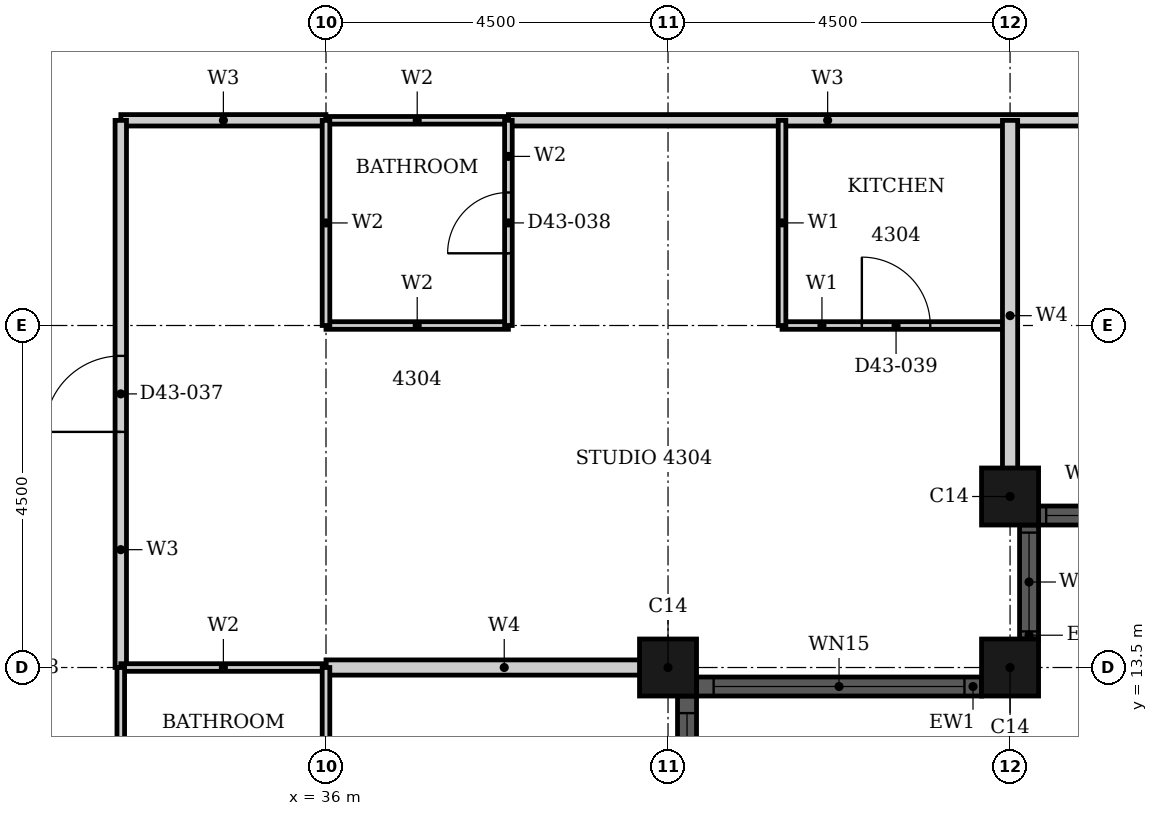
"""IFC4 building model, lengths in metres.
Left out: names, types, materials, properties, quantities, classifications, styles, units other than length and angle.
Written with IfcOpenShell. Run it as: python <this file> out.ifc"""

import sys

from ifc_helpers import new_model, si_unit, direction, frame, frame_2d, origin, origin_2d, place, context, subcontext, project, spatial, rectangle, hollow_rectangle, extrude, element, fill, save


model = new_model("IFC4")
c1 = context("Model", 3, precision=1e-05, world=origin(), true_north=direction((0.0, 1.0)))
c2 = subcontext(c1, "Body", "Model", "MODEL_VIEW")
j1 = project(units=[si_unit("LENGTHUNIT", "METRE"), si_unit("PLANEANGLEUNIT", "RADIAN")], contexts=[c1])
p1 = place(None, origin())
s1 = spatial("IfcSite", under=j1, at=p1, CompositionType="ELEMENT")
p2 = place(p1, origin())
s2 = spatial("IfcBuilding", under=s1, at=p2, CompositionType="ELEMENT")
p3 = place(p2, frame((0.0, 0.0, 172.8)))
s3 = spatial("IfcBuildingStorey", under=s2, at=p3, CompositionType="ELEMENT", Elevation=172.8)
for number, where, z_axis, x_axis in (
    (1, (40.5, 13.5, 0.0), (0.0, 0.0, 1.0), (1.0, 0.0, 0.0)),
    (2, (45.0, 13.5, 0.0), (0.0, 0.0, 1.0), (1.0, 0.0, 0.0)),
    (3, (45.0, 15.75, 0.0), (0.0, 0.0, 1.0), (1.0, 0.0, 0.0)),
):
    element("IfcColumn", number, at=place(p3, frame(where, z_axis=z_axis, x_axis=x_axis)), inside=s3, PredefinedType="COLUMN", context=c2, shape_type="SweptSolid", body=[
        extrude(hollow_rectangle(XDim=0.75, YDim=0.75, WallThickness=0.024, at=origin_2d()), origin(), (0.0, 0.0, 1.0), 3.7),
    ])
p4 = place(p3, frame((40.75, 4.875, 0.0), z_axis=(0.0, 0.0, 1.0), x_axis=(0.0, 1.0, 0.0)))
e4 = element("IfcWall", 4, at=p4, inside=s3, PredefinedType="SOLIDWALL", context=c2, shape_type="SweptSolid", body=[
    extrude(rectangle(XDim=8.25, YDim=0.25, at=frame_2d((4.125, 0.0))), origin(), (0.0, 0.0, 1.0), 3.7),
])
p5 = place(p4, frame((0.225, 0.0, 0.45)))
e5 = element("IfcOpeningElement", 5, at=p5, cuts=e4, PredefinedType="OPENING", context=c2, shape_type="SweptSolid", body=[
    extrude(rectangle(XDim=3.3, YDim=2.3, at=frame_2d((1.65, 1.15))), frame((0.0, 0.135, 0.0), z_axis=(0.0, -1.0, 0.0), x_axis=(1.0, 0.0, 0.0)), (0.0, 0.0, 1.0), 0.27),
])
p6 = place(p4, frame((4.725, 0.0, 0.45)))
e6 = element("IfcOpeningElement", 6, at=p6, cuts=e4, PredefinedType="OPENING", context=c2, shape_type="SweptSolid", body=[
    extrude(rectangle(XDim=3.3, YDim=2.3, at=frame_2d((1.65, 1.15))), frame((0.0, 0.135, 0.0), z_axis=(0.0, -1.0, 0.0), x_axis=(1.0, 0.0, 0.0)), (0.0, 0.0, 1.0), 0.27),
])
p7 = place(p3, frame((40.875, 13.25, 0.0), z_axis=(0.0, 0.0, 1.0), x_axis=(1.0, 0.0, 0.0)))
e7 = element("IfcWall", 7, at=p7, inside=s3, PredefinedType="SOLIDWALL", context=c2, shape_type="SweptSolid", body=[
    extrude(rectangle(XDim=3.75, YDim=0.25, at=frame_2d((1.875, 0.0))), origin(), (0.0, 0.0, 1.0), 3.7),
])
p8 = place(p7, frame((0.225, 0.0, 0.45)))
e8 = element("IfcOpeningElement", 8, at=p8, cuts=e7, PredefinedType="OPENING", context=c2, shape_type="SweptSolid", body=[
    extrude(rectangle(XDim=3.3, YDim=2.3, at=frame_2d((1.65, 1.15))), frame((0.0, 0.135, 0.0), z_axis=(0.0, -1.0, 0.0), x_axis=(1.0, 0.0, 0.0)), (0.0, 0.0, 1.0), 0.27),
])
p9 = place(p3, frame((45.25, 13.875, 0.0), z_axis=(0.0, 0.0, 1.0), x_axis=(0.0, 1.0, 0.0)))
e9 = element("IfcWall", 9, at=p9, inside=s3, PredefinedType="SOLIDWALL", context=c2, shape_type="SweptSolid", body=[
    extrude(rectangle(XDim=1.5, YDim=0.25, at=frame_2d((0.75, 0.0))), origin(), (0.0, 0.0, 1.0), 3.7),
])
p10 = place(p9, frame((0.1, 0.0, 0.9)))
e10 = element("IfcOpeningElement", 10, at=p10, cuts=e9, PredefinedType="OPENING", context=c2, shape_type="SweptSolid", body=[
    extrude(rectangle(XDim=1.3, YDim=1.85, at=frame_2d((0.65, 0.925))), frame((0.0, 0.135, 0.0), z_axis=(0.0, -1.0, 0.0), x_axis=(1.0, 0.0, 0.0)), (0.0, 0.0, 1.0), 0.27),
])
p11 = place(p3, frame((45.375, 15.5, 0.0), z_axis=(0.0, 0.0, 1.0), x_axis=(1.0, 0.0, 0.0)))
e11 = element("IfcWall", 11, at=p11, inside=s3, PredefinedType="SOLIDWALL", context=c2, shape_type="SweptSolid", body=[
    extrude(rectangle(XDim=1.5, YDim=0.25, at=frame_2d((0.75, 0.0))), origin(), (0.0, 0.0, 1.0), 3.7),
])
p12 = place(p11, frame((0.1, 0.0, 0.9)))
e12 = element("IfcOpeningElement", 12, at=p12, cuts=e11, PredefinedType="OPENING", context=c2, shape_type="SweptSolid", body=[
    extrude(rectangle(XDim=1.3, YDim=1.85, at=frame_2d((0.65, 0.925))), frame((0.0, 0.135, 0.0), z_axis=(0.0, -1.0, 0.0), x_axis=(1.0, 0.0, 0.0)), (0.0, 0.0, 1.0), 0.27),
])
p13 = place(p3, frame((33.301, 20.7, 0.0), z_axis=(0.0, 0.0, 1.0), x_axis=(1.0, 0.0, 0.0)))
e13 = element("IfcWall", 13, at=p13, inside=s3, PredefinedType="PARTITIONING", context=c2, shape_type="SweptSolid", body=[
    extrude(rectangle(XDim=2.698, YDim=0.15, at=frame_2d((1.349, 0.0))), origin(), (0.0, 0.0, 1.0), 3.4),
])
p14 = place(p3, frame((38.4, 20.7, 0.0), z_axis=(0.0, 0.0, 1.0), x_axis=(1.0, 0.0, 0.0)))
e14 = element("IfcWall", 14, at=p14, inside=s3, PredefinedType="PARTITIONING", context=c2, shape_type="SweptSolid", body=[
    extrude(rectangle(XDim=8.4, YDim=0.15, at=frame_2d((4.2, 0.0))), origin(), (0.0, 0.0, 1.0), 3.4),
])
p15 = place(p3, frame((33.3, 13.501, 0.0), z_axis=(0.0, 0.0, 1.0), x_axis=(0.0, 1.0, 0.0)))
e15 = element("IfcWall", 15, at=p15, inside=s3, PredefinedType="PARTITIONING", context=c2, shape_type="SweptSolid", body=[
    extrude(rectangle(XDim=7.198, YDim=0.15, at=frame_2d((3.599, 0.0))), origin(), (0.0, 0.0, 1.0), 3.4),
])
p16 = place(p15, frame((3.099, 0.0, 0.0)))
e16 = element("IfcOpeningElement", 16, at=p16, cuts=e15, PredefinedType="OPENING", context=c2, shape_type="SweptSolid", body=[
    extrude(rectangle(XDim=1.0, YDim=2.2, at=frame_2d((0.5, 1.1))), frame((0.0, 0.085, 0.0), z_axis=(0.0, -1.0, 0.0), x_axis=(1.0, 0.0, 0.0)), (0.0, 0.0, 1.0), 0.17),
])
p17 = place(p3, frame((42.0, 18.0, 0.0), z_axis=(0.0, 0.0, 1.0), x_axis=(1.0, 0.0, 0.0)))
e17 = element("IfcWall", 17, at=p17, inside=s3, PredefinedType="PARTITIONING", context=c2, shape_type="SweptSolid", body=[
    extrude(rectangle(XDim=3.0, YDim=0.1, at=frame_2d((1.5, 0.0))), origin(), (0.0, 0.0, 1.0), 3.4),
])
p18 = place(p17, frame((1.05, 0.0, 0.0)))
e18 = element("IfcOpeningElement", 18, at=p18, cuts=e17, PredefinedType="OPENING", context=c2, shape_type="SweptSolid", body=[
    extrude(rectangle(XDim=0.9, YDim=2.1, at=frame_2d((0.45, 1.05))), frame((0.0, 0.06, 0.0), z_axis=(0.0, -1.0, 0.0), x_axis=(1.0, 0.0, 0.0)), (0.0, 0.0, 1.0), 0.12),
])
p19 = place(p3, frame((42.0, 18.0, 0.0), z_axis=(0.0, 0.0, 1.0), x_axis=(0.0, 1.0, 0.0)))
e19 = element("IfcWall", 19, at=p19, inside=s3, PredefinedType="PARTITIONING", context=c2, shape_type="SweptSolid", body=[
    extrude(rectangle(XDim=2.7, YDim=0.1, at=frame_2d((1.35, 0.0))), origin(), (0.0, 0.0, 1.0), 3.4),
])
p20 = place(p3, frame((36.0, 13.5, 0.0), z_axis=(0.0, 0.0, 1.0), x_axis=(1.0, 0.0, 0.0)))
e20 = element("IfcWall", 20, at=p20, inside=s3, PredefinedType="PARTITIONING", context=c2, shape_type="SweptSolid", body=[
    extrude(rectangle(XDim=4.69, YDim=0.2, at=frame_2d((2.345, 0.0))), origin(), (0.0, 0.0, 1.0), 2.48),
])
p21 = place(p3, frame((45.0, 15.56, 0.0), z_axis=(0.0, 0.0, 1.0), x_axis=(0.0, 1.0, 0.0)))
e21 = element("IfcWall", 21, at=p21, inside=s3, PredefinedType="PARTITIONING", context=c2, shape_type="SweptSolid", body=[
    extrude(rectangle(XDim=5.139, YDim=0.2, at=frame_2d((2.569, 0.0))), origin(), (0.0, 0.0, 1.0), 3.4),
])
p22 = place(p3, frame((33.301, 13.5, 0.0), z_axis=(0.0, 0.0, 1.0), x_axis=(1.0, 0.0, 0.0)))
e22 = element("IfcWall", 22, at=p22, inside=s3, PredefinedType="PARTITIONING", context=c2, shape_type="SweptSolid", body=[
    extrude(rectangle(XDim=2.698, YDim=0.1, at=frame_2d((1.349, 0.0))), origin(), (0.0, 0.0, 1.0), 2.48),
])
for number, where, z_axis, x_axis in (
    (23, (36.0, 18.0, 0.0), (0.0, 0.0, 1.0), (1.0, 0.0, 0.0)),
    (24, (36.0, 20.7, 0.0), (0.0, 0.0, 1.0), (1.0, 0.0, 0.0)),
    (25, (33.3, 11.1, 0.0), (0.0, 0.0, 1.0), (0.0, 1.0, 0.0)),
):
    element("IfcWall", number, at=place(p3, frame(where, z_axis=z_axis, x_axis=x_axis)), inside=s3, PredefinedType="PARTITIONING", context=c2, shape_type="SweptSolid", body=[
        extrude(rectangle(XDim=2.4, YDim=0.1, at=frame_2d((1.2, 0.0))), origin(), (0.0, 0.0, 1.0), 3.4),
    ])
p23 = place(p3, frame((36.0, 11.1, 0.0), z_axis=(0.0, 0.0, 1.0), x_axis=(0.0, 1.0, 0.0)))
e26 = element("IfcWall", 26, at=p23, inside=s3, PredefinedType="PARTITIONING", context=c2, shape_type="SweptSolid", body=[
    extrude(rectangle(XDim=2.4, YDim=0.1, at=frame_2d((1.2, 0.0))), origin(), (0.0, 0.0, 1.0), 2.68),
])
p24 = place(p3, frame((36.0, 18.0, 0.0), z_axis=(0.0, 0.0, 1.0), x_axis=(0.0, 1.0, 0.0)))
e27 = element("IfcWall", 27, at=p24, inside=s3, PredefinedType="PARTITIONING", context=c2, shape_type="SweptSolid", body=[
    extrude(rectangle(XDim=2.699, YDim=0.1, at=frame_2d((1.35, 0.0))), origin(), (0.0, 0.0, 1.0), 3.4),
])
p25 = place(p3, frame((38.4, 18.0, 0.0), z_axis=(0.0, 0.0, 1.0), x_axis=(0.0, 1.0, 0.0)))
e28 = element("IfcWall", 28, at=p25, inside=s3, PredefinedType="PARTITIONING", context=c2, shape_type="SweptSolid", body=[
    extrude(rectangle(XDim=2.7, YDim=0.1, at=frame_2d((1.35, 0.0))), origin(), (0.0, 0.0, 1.0), 3.4),
])
p26 = place(p25, frame((0.95, 0.0, 0.0)))
e29 = element("IfcOpeningElement", 29, at=p26, cuts=e28, PredefinedType="OPENING", context=c2, shape_type="SweptSolid", body=[
    extrude(rectangle(XDim=0.8, YDim=2.1, at=frame_2d((0.4, 1.05))), frame((0.0, 0.06, 0.0), z_axis=(0.0, -1.0, 0.0), x_axis=(1.0, 0.0, 0.0)), (0.0, 0.0, 1.0), 0.12),
])
p27 = place(p6, origin())
e30 = element("IfcWindow", 30, at=p27, inside=s3, PartitioningType="SINGLE_PANEL", PredefinedType="WINDOW", context=c2, shape_type="SweptSolid", body=[
    extrude(rectangle(XDim=3.3, YDim=2.3, at=frame_2d((1.65, 1.15))), frame((0.0, 0.03, 0.0), z_axis=(0.0, -1.0, 0.0), x_axis=(1.0, 0.0, 0.0)), (0.0, 0.0, 1.0), 0.06),
])
fill(e6, e30)
p28 = place(p8, origin())
e31 = element("IfcWindow", 31, at=p28, inside=s3, PartitioningType="SINGLE_PANEL", PredefinedType="WINDOW", context=c2, shape_type="SweptSolid", body=[
    extrude(rectangle(XDim=3.3, YDim=2.3, at=frame_2d((1.65, 1.15))), frame((0.0, 0.03, 0.0), z_axis=(0.0, -1.0, 0.0), x_axis=(1.0, 0.0, 0.0)), (0.0, 0.0, 1.0), 0.06),
])
fill(e8, e31)
p29 = place(p10, origin())
e32 = element("IfcWindow", 32, at=p29, inside=s3, PartitioningType="SINGLE_PANEL", PredefinedType="WINDOW", context=c2, shape_type="SweptSolid", body=[
    extrude(rectangle(XDim=1.3, YDim=1.85, at=frame_2d((0.65, 0.925))), frame((0.0, 0.03, 0.0), z_axis=(0.0, -1.0, 0.0), x_axis=(1.0, 0.0, 0.0)), (0.0, 0.0, 1.0), 0.06),
])
fill(e10, e32)
p30 = place(p12, origin())
e33 = element("IfcWindow", 33, at=p30, inside=s3, PartitioningType="SINGLE_PANEL", PredefinedType="WINDOW", context=c2, shape_type="SweptSolid", body=[
    extrude(rectangle(XDim=1.3, YDim=1.85, at=frame_2d((0.65, 0.925))), frame((0.0, 0.03, 0.0), z_axis=(0.0, -1.0, 0.0), x_axis=(1.0, 0.0, 0.0)), (0.0, 0.0, 1.0), 0.06),
])
fill(e12, e33)
p31 = place(p16, origin())
e34 = element("IfcDoor", 34, at=p31, inside=s3, OperationType="SINGLE_SWING_LEFT", PredefinedType="DOOR", context=c2, shape_type="SweptSolid", body=[
    extrude(rectangle(XDim=1.0, YDim=2.2, at=frame_2d((0.5, 1.1))), frame((0.0, 0.025, 0.0), z_axis=(0.0, -1.0, 0.0), x_axis=(1.0, 0.0, 0.0)), (0.0, 0.0, 1.0), 0.05),
])
fill(e16, e34)
p32 = place(p26, origin())
e35 = element("IfcDoor", 35, at=p32, inside=s3, OperationType="SINGLE_SWING_LEFT", PredefinedType="DOOR", context=c2, shape_type="SweptSolid", body=[
    extrude(rectangle(XDim=0.8, YDim=2.1, at=frame_2d((0.4, 1.05))), frame((0.0, 0.025, 0.0), z_axis=(0.0, -1.0, 0.0), x_axis=(1.0, 0.0, 0.0)), (0.0, 0.0, 1.0), 0.05),
])
fill(e29, e35)
p33 = place(p18, origin())
e36 = element("IfcDoor", 36, at=p33, inside=s3, OperationType="SINGLE_SWING_RIGHT", PredefinedType="DOOR", context=c2, shape_type="SweptSolid", body=[
    extrude(rectangle(XDim=0.9, YDim=2.1, at=frame_2d((0.45, 1.05))), frame((0.0, 0.025, 0.0), z_axis=(0.0, -1.0, 0.0), x_axis=(1.0, 0.0, 0.0)), (0.0, 0.0, 1.0), 0.05),
])
fill(e18, e36)
save(model, sys.argv[1])
